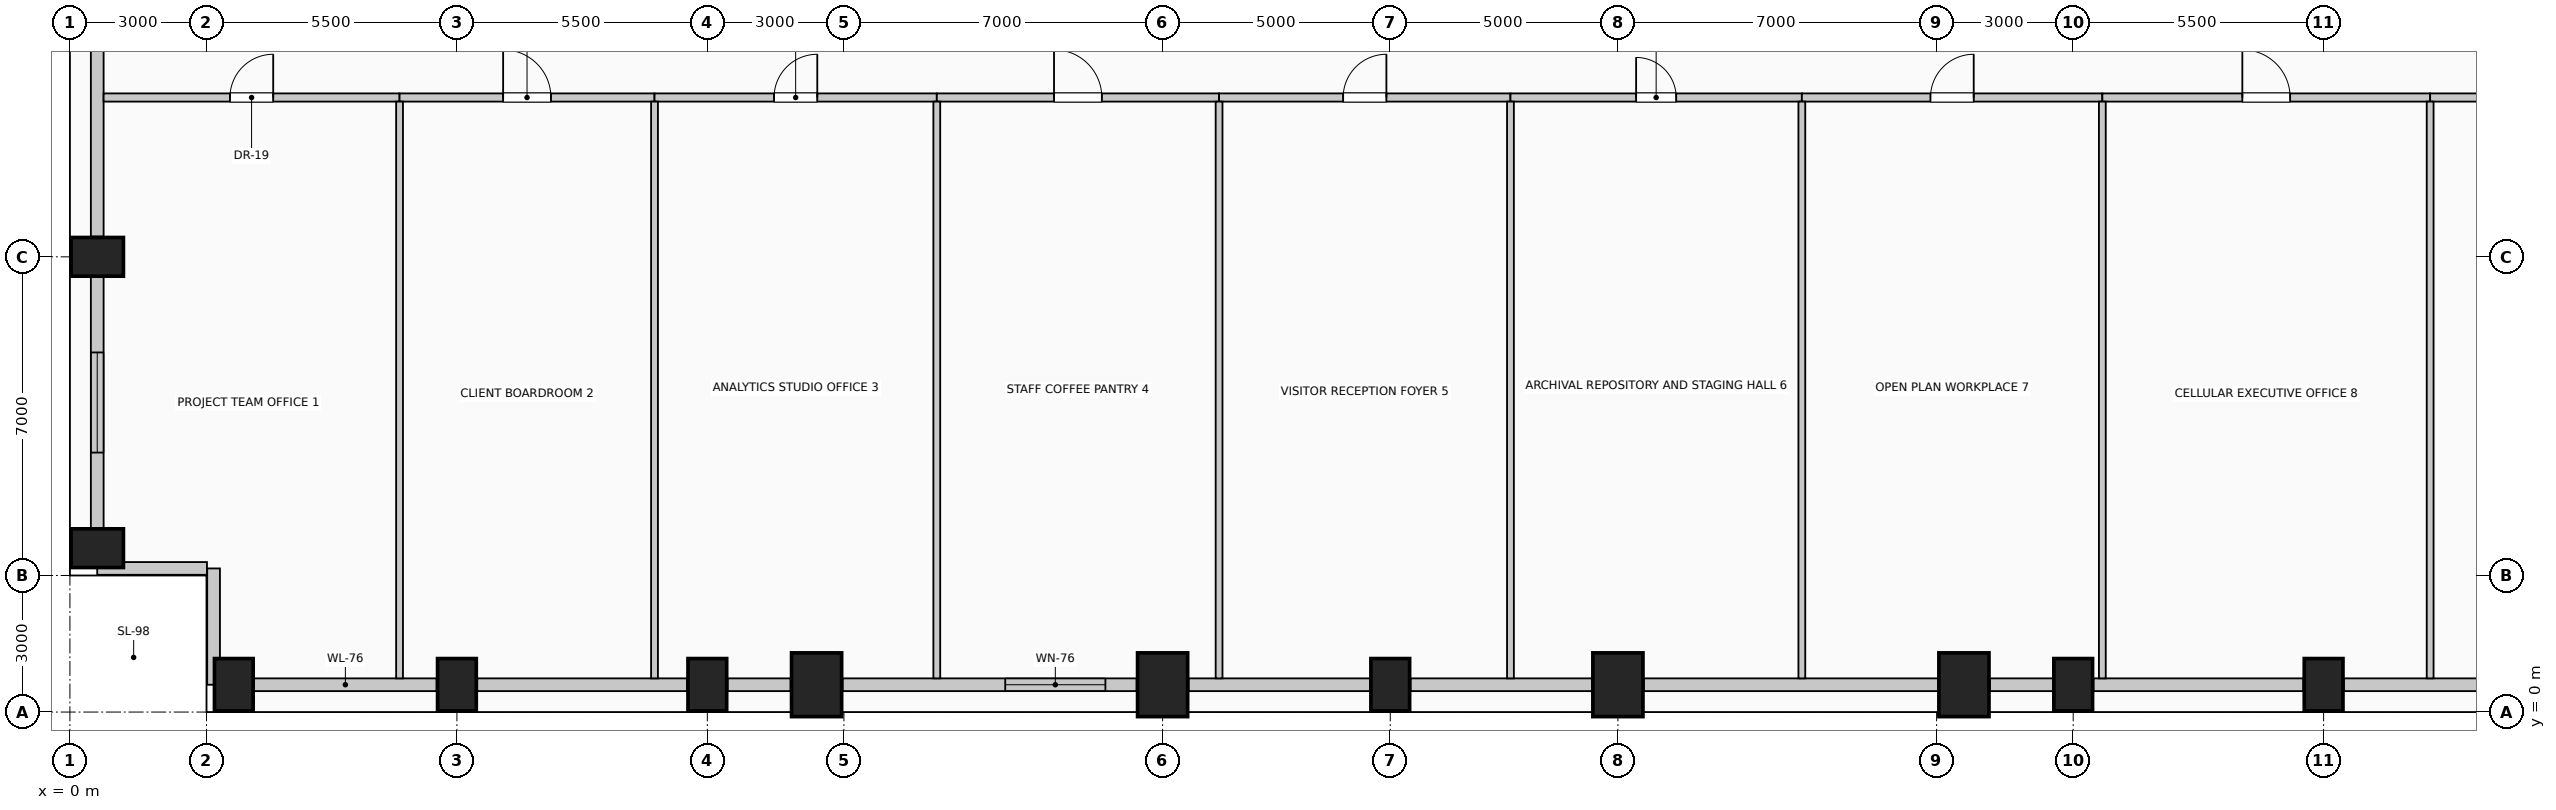
"""IFC4 building model, lengths in metres.
Left out: names, types, materials, properties, quantities, classifications, styles, units other than length and angle.
Written with IfcOpenShell. Run it as: python <this file> out.ifc"""

import sys

from ifc_helpers import new_model, si_unit, direction, frame, frame_2d, origin, origin_2d, place, context, subcontext, project, spatial, rectangle, extrude, element, fill, save


model = new_model("IFC4")
c1 = context("Model", 3, precision=1e-05, world=origin(), true_north=direction((0.0, 1.0)))
c2 = subcontext(c1, "Body", "Model", "MODEL_VIEW")
j1 = project(units=[si_unit("LENGTHUNIT", "METRE"), si_unit("PLANEANGLEUNIT", "RADIAN")], contexts=[c1])
p1 = place(None, origin())
s1 = spatial("IfcSite", under=j1, at=p1, CompositionType="ELEMENT")
p2 = place(p1, origin())
s2 = spatial("IfcBuilding", under=s1, at=p2, CompositionType="ELEMENT")
p3 = place(p2, frame((0.0, 0.0, 148.6)))
s3 = spatial("IfcBuildingStorey", under=s2, at=p3, CompositionType="ELEMENT", Elevation=148.6)
for number, where, z_axis, x_axis in (
    (1, (3.6, 0.6, 0.0), (0.0, 0.0, 1.0), (1.0, 0.0, 0.0)),
    (2, (8.5, 0.6, 0.0), (0.0, 0.0, 1.0), (1.0, 0.0, 0.0)),
    (3, (14.0, 0.6, 0.0), (0.0, 0.0, 1.0), (1.0, 0.0, 0.0)),
):
    element("IfcColumn", number, at=place(p3, frame(where, z_axis=z_axis, x_axis=x_axis)), inside=s3, PredefinedType="COLUMN", context=c2, shape_type="SweptSolid", body=[
        extrude(rectangle(XDim=0.85, YDim=1.15, at=origin_2d()), origin(), (0.0, 0.0, 1.0), 4.0),
    ])
for number, where, z_axis, x_axis in (
    (4, (16.4, 0.6, 0.0), (0.0, 0.0, 1.0), (1.0, 0.0, 0.0)),
    (5, (24.0, 0.6, 0.0), (0.0, 0.0, 1.0), (1.0, 0.0, 0.0)),
):
    element("IfcColumn", number, at=place(p3, frame(where, z_axis=z_axis, x_axis=x_axis)), inside=s3, PredefinedType="COLUMN", context=c2, shape_type="SweptSolid", body=[
        extrude(rectangle(XDim=1.1, YDim=1.4, at=origin_2d()), origin(), (0.0, 0.0, 1.0), 4.0),
    ])
p4 = place(p3, frame((29.0, 0.6, 0.0), z_axis=(0.0, 0.0, 1.0), x_axis=(1.0, 0.0, 0.0)))
e6 = element("IfcColumn", 6, at=p4, inside=s3, PredefinedType="COLUMN", context=c2, shape_type="SweptSolid", body=[
    extrude(rectangle(XDim=0.85, YDim=1.15, at=origin_2d()), origin(), (0.0, 0.0, 1.0), 4.0),
])
for number, where, z_axis, x_axis in (
    (7, (34.0, 0.6, 0.0), (0.0, 0.0, 1.0), (1.0, 0.0, 0.0)),
    (8, (41.6, 0.6, 0.0), (0.0, 0.0, 1.0), (1.0, 0.0, 0.0)),
):
    element("IfcColumn", number, at=place(p3, frame(where, z_axis=z_axis, x_axis=x_axis)), inside=s3, PredefinedType="COLUMN", context=c2, shape_type="SweptSolid", body=[
        extrude(rectangle(XDim=1.1, YDim=1.4, at=origin_2d()), origin(), (0.0, 0.0, 1.0), 4.0),
    ])
for number, where, z_axis, x_axis in (
    (9, (44.0, 0.6, 0.0), (0.0, 0.0, 1.0), (1.0, 0.0, 0.0)),
    (10, (49.5, 0.6, 0.0), (0.0, 0.0, 1.0), (1.0, 0.0, 0.0)),
    (11, (0.6, 3.6, 0.0), (0.0, 0.0, 1.0), (0.0, 1.0, 0.0)),
    (12, (0.6, 10.0, 0.0), (0.0, 0.0, 1.0), (0.0, 1.0, 0.0)),
):
    element("IfcColumn", number, at=place(p3, frame(where, z_axis=z_axis, x_axis=x_axis)), inside=s3, PredefinedType="COLUMN", context=c2, shape_type="SweptSolid", body=[
        extrude(rectangle(XDim=0.85, YDim=1.15, at=origin_2d()), origin(), (0.0, 0.0, 1.0), 4.0),
    ])
p5 = place(p3, frame((8.055, 0.6, 0.0), z_axis=(0.0, 0.0, 1.0), x_axis=(-1.0, 0.0, 0.0)))
e13 = element("IfcWall", 13, at=p5, inside=s3, PredefinedType="SOLIDWALL", context=c2, shape_type="SweptSolid", body=[
    extrude(rectangle(XDim=4.01, YDim=0.28, at=frame_2d((2.005, 0.0))), origin(), (0.0, 0.0, 1.0), 2.875),
])
p6 = place(p3, frame((13.555, 0.6, 0.0), z_axis=(0.0, 0.0, 1.0), x_axis=(-1.0, 0.0, 0.0)))
e14 = element("IfcWall", 14, at=p6, inside=s3, PredefinedType="SOLIDWALL", context=c2, shape_type="SweptSolid", body=[
    extrude(rectangle(XDim=4.61, YDim=0.28, at=frame_2d((2.305, 0.0))), origin(), (0.0, 0.0, 1.0), 2.875),
])
p7 = place(p3, frame((15.83, 0.6, 0.0), z_axis=(0.0, 0.0, 1.0), x_axis=(-1.0, 0.0, 0.0)))
e15 = element("IfcWall", 15, at=p7, inside=s3, PredefinedType="SOLIDWALL", context=c2, shape_type="SweptSolid", body=[
    extrude(rectangle(XDim=1.385, YDim=0.28, at=frame_2d((0.692, 0.0))), origin(), (0.0, 0.0, 1.0), 2.875),
])
p8 = place(p3, frame((23.43, 0.6, 0.0), z_axis=(0.0, 0.0, 1.0), x_axis=(-1.0, 0.0, 0.0)))
e16 = element("IfcWall", 16, at=p8, inside=s3, PredefinedType="SOLIDWALL", context=c2, shape_type="SweptSolid", body=[
    extrude(rectangle(XDim=6.46, YDim=0.28, at=frame_2d((3.23, 0.0))), origin(), (0.0, 0.0, 1.0), 2.875),
])
p9 = place(p8, frame((0.687, 0.0, 0.5)))
e17 = element("IfcOpeningElement", 17, at=p9, cuts=e16, PredefinedType="OPENING", context=c2, shape_type="SweptSolid", body=[
    extrude(rectangle(XDim=2.2, YDim=1.95, at=frame_2d((1.1, 0.975))), frame((0.0, 0.15, 0.0), z_axis=(0.0, -1.0, 0.0), x_axis=(1.0, 0.0, 0.0)), (0.0, 0.0, 1.0), 0.3),
])
for number, where, z_axis, x_axis in (
    (18, (28.555, 0.6, 0.0), (0.0, 0.0, 1.0), (-1.0, 0.0, 0.0)),
    (19, (33.43, 0.6, 0.0), (0.0, 0.0, 1.0), (-1.0, 0.0, 0.0)),
):
    element("IfcWall", number, at=place(p3, frame(where, z_axis=z_axis, x_axis=x_axis)), inside=s3, PredefinedType="SOLIDWALL", context=c2, shape_type="SweptSolid", body=[
        extrude(rectangle(XDim=3.985, YDim=0.28, at=frame_2d((1.992, 0.0))), origin(), (0.0, 0.0, 1.0), 2.875),
    ])
p10 = place(p3, frame((41.03, 0.6, 0.0), z_axis=(0.0, 0.0, 1.0), x_axis=(-1.0, 0.0, 0.0)))
e20 = element("IfcWall", 20, at=p10, inside=s3, PredefinedType="SOLIDWALL", context=c2, shape_type="SweptSolid", body=[
    extrude(rectangle(XDim=6.46, YDim=0.28, at=frame_2d((3.23, 0.0))), origin(), (0.0, 0.0, 1.0), 2.875),
])
p11 = place(p3, frame((43.555, 0.6, 0.0), z_axis=(0.0, 0.0, 1.0), x_axis=(-1.0, 0.0, 0.0)))
e21 = element("IfcWall", 21, at=p11, inside=s3, PredefinedType="SOLIDWALL", context=c2, shape_type="SweptSolid", body=[
    extrude(rectangle(XDim=1.385, YDim=0.28, at=frame_2d((0.692, 0.0))), origin(), (0.0, 0.0, 1.0), 2.875),
])
p12 = place(p3, frame((49.055, 0.6, 0.0), z_axis=(0.0, 0.0, 1.0), x_axis=(-1.0, 0.0, 0.0)))
e22 = element("IfcWall", 22, at=p12, inside=s3, PredefinedType="SOLIDWALL", context=c2, shape_type="SweptSolid", body=[
    extrude(rectangle(XDim=4.61, YDim=0.28, at=frame_2d((2.305, 0.0))), origin(), (0.0, 0.0, 1.0), 2.875),
])
p13 = place(p3, frame((53.955, 0.6, 0.0), z_axis=(0.0, 0.0, 1.0), x_axis=(-1.0, 0.0, 0.0)))
e23 = element("IfcWall", 23, at=p13, inside=s3, PredefinedType="SOLIDWALL", context=c2, shape_type="SweptSolid", body=[
    extrude(rectangle(XDim=4.01, YDim=0.28, at=frame_2d((2.005, 0.0))), origin(), (0.0, 0.0, 1.0), 2.875),
])
p14 = place(p3, frame((0.6, 4.045, 0.0), z_axis=(0.0, 0.0, 1.0), x_axis=(0.0, 1.0, 0.0)))
e24 = element("IfcWall", 24, at=p14, inside=s3, PredefinedType="SOLIDWALL", context=c2, shape_type="SweptSolid", body=[
    extrude(rectangle(XDim=5.51, YDim=0.28, at=frame_2d((2.755, 0.0))), origin(), (0.0, 0.0, 1.0), 2.875),
])
p15 = place(p14, frame((1.655, 0.0, 0.5)))
e25 = element("IfcOpeningElement", 25, at=p15, cuts=e24, PredefinedType="OPENING", context=c2, shape_type="SweptSolid", body=[
    extrude(rectangle(XDim=2.2, YDim=1.95, at=frame_2d((1.1, 0.975))), frame((0.0, 0.15, 0.0), z_axis=(0.0, -1.0, 0.0), x_axis=(1.0, 0.0, 0.0)), (0.0, 0.0, 1.0), 0.3),
])
p16 = place(p3, frame((0.6, 10.445, 0.0), z_axis=(0.0, 0.0, 1.0), x_axis=(0.0, 1.0, 0.0)))
e26 = element("IfcWall", 26, at=p16, inside=s3, PredefinedType="SOLIDWALL", context=c2, shape_type="SweptSolid", body=[
    extrude(rectangle(XDim=7.11, YDim=0.28, at=frame_2d((3.555, 0.0))), origin(), (0.0, 0.0, 1.0), 2.875),
])
p17 = place(p3, frame((3.155, 0.6, 0.0), z_axis=(0.0, 0.0, 1.0), x_axis=(0.0, 1.0, 0.0)))
e27 = element("IfcWall", 27, at=p17, inside=s3, PredefinedType="SOLIDWALL", context=c2, shape_type="SweptSolid", body=[
    extrude(rectangle(XDim=2.555, YDim=0.28, at=frame_2d((1.277, 0.0))), origin(), (0.0, 0.0, 1.0), 3.725),
])
p18 = place(p3, frame((3.01, 3.155, 0.0), z_axis=(0.0, 0.0, 1.0), x_axis=(-1.0, 0.0, 0.0)))
e28 = element("IfcWall", 28, at=p18, inside=s3, PredefinedType="SOLIDWALL", context=c2, shape_type="SweptSolid", body=[
    extrude(rectangle(XDim=2.41, YDim=0.28, at=frame_2d((1.205, 0.0))), origin(), (0.0, 0.0, 1.0), 3.725),
])
p19 = place(p3, frame((0.74, 13.5, 0.0), z_axis=(0.0, 0.0, 1.0), x_axis=(1.0, 0.0, 0.0)))
e29 = element("IfcWall", 29, at=p19, inside=s3, PredefinedType="PARTITIONING", context=c2, shape_type="SweptSolid", body=[
    extrude(rectangle(XDim=6.5, YDim=0.18, at=frame_2d((3.25, 0.0))), origin(), (0.0, 0.0, 1.0), 3.725),
])
p20 = place(p19, frame((2.775, 0.0, 0.0)))
e30 = element("IfcOpeningElement", 30, at=p20, cuts=e29, PredefinedType="OPENING", context=c2, shape_type="SweptSolid", body=[
    extrude(rectangle(XDim=0.95, YDim=2.15, at=frame_2d((0.475, 1.075))), frame((0.0, 0.1, 0.0), z_axis=(0.0, -1.0, 0.0), x_axis=(1.0, 0.0, 0.0)), (0.0, 0.0, 1.0), 0.2),
])
p21 = place(p3, frame((7.24, 13.5, 0.0), z_axis=(0.0, 0.0, 1.0), x_axis=(1.0, 0.0, 0.0)))
e31 = element("IfcWall", 31, at=p21, inside=s3, PredefinedType="PARTITIONING", context=c2, shape_type="SweptSolid", body=[
    extrude(rectangle(XDim=5.6, YDim=0.18, at=frame_2d((2.8, 0.0))), origin(), (0.0, 0.0, 1.0), 3.725),
])
p22 = place(p21, frame((2.275, 0.0, 0.0)))
e32 = element("IfcOpeningElement", 32, at=p22, cuts=e31, PredefinedType="OPENING", context=c2, shape_type="SweptSolid", body=[
    extrude(rectangle(XDim=1.05, YDim=2.15, at=frame_2d((0.525, 1.075))), frame((0.0, 0.1, 0.0), z_axis=(0.0, -1.0, 0.0), x_axis=(1.0, 0.0, 0.0)), (0.0, 0.0, 1.0), 0.2),
])
p23 = place(p3, frame((12.84, 13.5, 0.0), z_axis=(0.0, 0.0, 1.0), x_axis=(1.0, 0.0, 0.0)))
e33 = element("IfcWall", 33, at=p23, inside=s3, PredefinedType="PARTITIONING", context=c2, shape_type="SweptSolid", body=[
    extrude(rectangle(XDim=6.2, YDim=0.18, at=frame_2d((3.1, 0.0))), origin(), (0.0, 0.0, 1.0), 3.725),
])
p24 = place(p23, frame((2.625, 0.0, 0.0)))
e34 = element("IfcOpeningElement", 34, at=p24, cuts=e33, PredefinedType="OPENING", context=c2, shape_type="SweptSolid", body=[
    extrude(rectangle(XDim=0.95, YDim=2.15, at=frame_2d((0.475, 1.075))), frame((0.0, 0.1, 0.0), z_axis=(0.0, -1.0, 0.0), x_axis=(1.0, 0.0, 0.0)), (0.0, 0.0, 1.0), 0.2),
])
p25 = place(p3, frame((19.04, 13.5, 0.0), z_axis=(0.0, 0.0, 1.0), x_axis=(1.0, 0.0, 0.0)))
e35 = element("IfcWall", 35, at=p25, inside=s3, PredefinedType="PARTITIONING", context=c2, shape_type="SweptSolid", body=[
    extrude(rectangle(XDim=6.2, YDim=0.18, at=frame_2d((3.1, 0.0))), origin(), (0.0, 0.0, 1.0), 3.725),
])
p26 = place(p25, frame((2.575, 0.0, 0.0)))
e36 = element("IfcOpeningElement", 36, at=p26, cuts=e35, PredefinedType="OPENING", context=c2, shape_type="SweptSolid", body=[
    extrude(rectangle(XDim=1.05, YDim=2.15, at=frame_2d((0.525, 1.075))), frame((0.0, 0.1, 0.0), z_axis=(0.0, -1.0, 0.0), x_axis=(1.0, 0.0, 0.0)), (0.0, 0.0, 1.0), 0.2),
])
p27 = place(p3, frame((25.24, 13.5, 0.0), z_axis=(0.0, 0.0, 1.0), x_axis=(1.0, 0.0, 0.0)))
e37 = element("IfcWall", 37, at=p27, inside=s3, PredefinedType="PARTITIONING", context=c2, shape_type="SweptSolid", body=[
    extrude(rectangle(XDim=6.4, YDim=0.18, at=frame_2d((3.2, 0.0))), origin(), (0.0, 0.0, 1.0), 3.725),
])
p28 = place(p27, frame((2.725, 0.0, 0.0)))
e38 = element("IfcOpeningElement", 38, at=p28, cuts=e37, PredefinedType="OPENING", context=c2, shape_type="SweptSolid", body=[
    extrude(rectangle(XDim=0.95, YDim=2.15, at=frame_2d((0.475, 1.075))), frame((0.0, 0.1, 0.0), z_axis=(0.0, -1.0, 0.0), x_axis=(1.0, 0.0, 0.0)), (0.0, 0.0, 1.0), 0.2),
])
p29 = place(p3, frame((31.64, 13.5, 0.0), z_axis=(0.0, 0.0, 1.0), x_axis=(1.0, 0.0, 0.0)))
e39 = element("IfcWall", 39, at=p29, inside=s3, PredefinedType="PARTITIONING", context=c2, shape_type="SweptSolid", body=[
    extrude(rectangle(XDim=6.4, YDim=0.18, at=frame_2d((3.2, 0.0))), origin(), (0.0, 0.0, 1.0), 3.725),
])
p30 = place(p29, frame((2.76, 0.0, 0.0)))
e40 = element("IfcOpeningElement", 40, at=p30, cuts=e39, PredefinedType="OPENING", context=c2, shape_type="SweptSolid", body=[
    extrude(rectangle(XDim=0.88, YDim=2.1, at=frame_2d((0.44, 1.05))), frame((0.0, 0.1, 0.0), z_axis=(0.0, -1.0, 0.0), x_axis=(1.0, 0.0, 0.0)), (0.0, 0.0, 1.0), 0.2),
])
p31 = place(p3, frame((38.04, 13.5, 0.0), z_axis=(0.0, 0.0, 1.0), x_axis=(1.0, 0.0, 0.0)))
e41 = element("IfcWall", 41, at=p31, inside=s3, PredefinedType="PARTITIONING", context=c2, shape_type="SweptSolid", body=[
    extrude(rectangle(XDim=6.6, YDim=0.18, at=frame_2d((3.3, 0.0))), origin(), (0.0, 0.0, 1.0), 3.725),
])
p32 = place(p31, frame((2.825, 0.0, 0.0)))
e42 = element("IfcOpeningElement", 42, at=p32, cuts=e41, PredefinedType="OPENING", context=c2, shape_type="SweptSolid", body=[
    extrude(rectangle(XDim=0.95, YDim=2.15, at=frame_2d((0.475, 1.075))), frame((0.0, 0.1, 0.0), z_axis=(0.0, -1.0, 0.0), x_axis=(1.0, 0.0, 0.0)), (0.0, 0.0, 1.0), 0.2),
])
p33 = place(p3, frame((44.64, 13.5, 0.0), z_axis=(0.0, 0.0, 1.0), x_axis=(1.0, 0.0, 0.0)))
e43 = element("IfcWall", 43, at=p33, inside=s3, PredefinedType="PARTITIONING", context=c2, shape_type="SweptSolid", body=[
    extrude(rectangle(XDim=7.2, YDim=0.18, at=frame_2d((3.6, 0.0))), origin(), (0.0, 0.0, 1.0), 3.725),
])
p34 = place(p33, frame((3.075, 0.0, 0.0)))
e44 = element("IfcOpeningElement", 44, at=p34, cuts=e43, PredefinedType="OPENING", context=c2, shape_type="SweptSolid", body=[
    extrude(rectangle(XDim=1.05, YDim=2.15, at=frame_2d((0.525, 1.075))), frame((0.0, 0.1, 0.0), z_axis=(0.0, -1.0, 0.0), x_axis=(1.0, 0.0, 0.0)), (0.0, 0.0, 1.0), 0.2),
])
p35 = place(p3, frame((51.84, 13.5, 0.0), z_axis=(0.0, 0.0, 1.0), x_axis=(1.0, 0.0, 0.0)))
e45 = element("IfcWall", 45, at=p35, inside=s3, PredefinedType="PARTITIONING", context=c2, shape_type="SweptSolid", body=[
    extrude(rectangle(XDim=5.42, YDim=0.18, at=frame_2d((2.71, 0.0))), origin(), (0.0, 0.0, 1.0), 3.725),
])
p36 = place(p35, frame((2.235, 0.0, 0.0)))
e46 = element("IfcOpeningElement", 46, at=p36, cuts=e45, PredefinedType="OPENING", context=c2, shape_type="SweptSolid", body=[
    extrude(rectangle(XDim=0.95, YDim=2.15, at=frame_2d((0.475, 1.075))), frame((0.0, 0.1, 0.0), z_axis=(0.0, -1.0, 0.0), x_axis=(1.0, 0.0, 0.0)), (0.0, 0.0, 1.0), 0.2),
])
for number, where, z_axis, x_axis in (
    (47, (7.24, 0.74, 0.0), (0.0, 0.0, 1.0), (0.0, 1.0, 0.0)),
    (48, (12.84, 0.74, 0.0), (0.0, 0.0, 1.0), (0.0, 1.0, 0.0)),
    (49, (19.04, 0.74, 0.0), (0.0, 0.0, 1.0), (0.0, 1.0, 0.0)),
    (50, (25.24, 0.74, 0.0), (0.0, 0.0, 1.0), (0.0, 1.0, 0.0)),
    (51, (31.64, 0.74, 0.0), (0.0, 0.0, 1.0), (0.0, 1.0, 0.0)),
    (52, (38.04, 0.74, 0.0), (0.0, 0.0, 1.0), (0.0, 1.0, 0.0)),
    (53, (44.64, 0.74, 0.0), (0.0, 0.0, 1.0), (0.0, 1.0, 0.0)),
    (54, (51.84, 0.74, 0.0), (0.0, 0.0, 1.0), (0.0, 1.0, 0.0)),
):
    element("IfcWall", number, at=place(p3, frame(where, z_axis=z_axis, x_axis=x_axis)), inside=s3, PredefinedType="PARTITIONING", context=c2, shape_type="SweptSolid", body=[
        extrude(rectangle(XDim=12.67, YDim=0.15, at=frame_2d((6.335, 0.0))), origin(), (0.0, 0.0, 1.0), 3.725),
    ])
p37 = place(p9, origin())
e55 = element("IfcWindow", 55, at=p37, inside=s3, PartitioningType="SINGLE_PANEL", PredefinedType="WINDOW", context=c2, shape_type="SweptSolid", body=[
    extrude(rectangle(XDim=2.2, YDim=1.95, at=frame_2d((1.1, 0.975))), frame((0.0, 0.03, 0.0), z_axis=(0.0, -1.0, 0.0), x_axis=(1.0, 0.0, 0.0)), (0.0, 0.0, 1.0), 0.06),
])
fill(e17, e55)
p38 = place(p15, origin())
e56 = element("IfcWindow", 56, at=p38, inside=s3, PartitioningType="SINGLE_PANEL", PredefinedType="WINDOW", context=c2, shape_type="SweptSolid", body=[
    extrude(rectangle(XDim=2.2, YDim=1.95, at=frame_2d((1.1, 0.975))), frame((0.0, 0.03, 0.0), z_axis=(0.0, -1.0, 0.0), x_axis=(1.0, 0.0, 0.0)), (0.0, 0.0, 1.0), 0.06),
])
fill(e25, e56)
p39 = place(p20, origin())
e57 = element("IfcDoor", 57, at=p39, inside=s3, OperationType="SINGLE_SWING_RIGHT", PredefinedType="DOOR", context=c2, shape_type="SweptSolid", body=[
    extrude(rectangle(XDim=0.95, YDim=2.15, at=frame_2d((0.475, 1.075))), frame((0.0, 0.025, 0.0), z_axis=(0.0, -1.0, 0.0), x_axis=(1.0, 0.0, 0.0)), (0.0, 0.0, 1.0), 0.05),
])
fill(e30, e57)
p40 = place(p22, origin())
e58 = element("IfcDoor", 58, at=p40, inside=s3, OperationType="SINGLE_SWING_LEFT", PredefinedType="DOOR", context=c2, shape_type="SweptSolid", body=[
    extrude(rectangle(XDim=1.05, YDim=2.15, at=frame_2d((0.525, 1.075))), frame((0.0, 0.025, 0.0), z_axis=(0.0, -1.0, 0.0), x_axis=(1.0, 0.0, 0.0)), (0.0, 0.0, 1.0), 0.05),
])
fill(e32, e58)
p41 = place(p24, origin())
e59 = element("IfcDoor", 59, at=p41, inside=s3, OperationType="SINGLE_SWING_RIGHT", PredefinedType="DOOR", context=c2, shape_type="SweptSolid", body=[
    extrude(rectangle(XDim=0.95, YDim=2.15, at=frame_2d((0.475, 1.075))), frame((0.0, 0.025, 0.0), z_axis=(0.0, -1.0, 0.0), x_axis=(1.0, 0.0, 0.0)), (0.0, 0.0, 1.0), 0.05),
])
fill(e34, e59)
p42 = place(p26, origin())
e60 = element("IfcDoor", 60, at=p42, inside=s3, OperationType="SINGLE_SWING_LEFT", PredefinedType="DOOR", context=c2, shape_type="SweptSolid", body=[
    extrude(rectangle(XDim=1.05, YDim=2.15, at=frame_2d((0.525, 1.075))), frame((0.0, 0.025, 0.0), z_axis=(0.0, -1.0, 0.0), x_axis=(1.0, 0.0, 0.0)), (0.0, 0.0, 1.0), 0.05),
])
fill(e36, e60)
p43 = place(p28, origin())
e61 = element("IfcDoor", 61, at=p43, inside=s3, OperationType="SINGLE_SWING_RIGHT", PredefinedType="DOOR", context=c2, shape_type="SweptSolid", body=[
    extrude(rectangle(XDim=0.95, YDim=2.15, at=frame_2d((0.475, 1.075))), frame((0.0, 0.025, 0.0), z_axis=(0.0, -1.0, 0.0), x_axis=(1.0, 0.0, 0.0)), (0.0, 0.0, 1.0), 0.05),
])
fill(e38, e61)
p44 = place(p30, origin())
e62 = element("IfcDoor", 62, at=p44, inside=s3, OperationType="SINGLE_SWING_LEFT", PredefinedType="DOOR", context=c2, shape_type="SweptSolid", body=[
    extrude(rectangle(XDim=0.88, YDim=2.1, at=frame_2d((0.44, 1.05))), frame((0.0, 0.025, 0.0), z_axis=(0.0, -1.0, 0.0), x_axis=(1.0, 0.0, 0.0)), (0.0, 0.0, 1.0), 0.05),
])
fill(e40, e62)
p45 = place(p32, origin())
e63 = element("IfcDoor", 63, at=p45, inside=s3, OperationType="SINGLE_SWING_RIGHT", PredefinedType="DOOR", context=c2, shape_type="SweptSolid", body=[
    extrude(rectangle(XDim=0.95, YDim=2.15, at=frame_2d((0.475, 1.075))), frame((0.0, 0.025, 0.0), z_axis=(0.0, -1.0, 0.0), x_axis=(1.0, 0.0, 0.0)), (0.0, 0.0, 1.0), 0.05),
])
fill(e42, e63)
p46 = place(p34, origin())
e64 = element("IfcDoor", 64, at=p46, inside=s3, OperationType="SINGLE_SWING_LEFT", PredefinedType="DOOR", context=c2, shape_type="SweptSolid", body=[
    extrude(rectangle(XDim=1.05, YDim=2.15, at=frame_2d((0.525, 1.075))), frame((0.0, 0.025, 0.0), z_axis=(0.0, -1.0, 0.0), x_axis=(1.0, 0.0, 0.0)), (0.0, 0.0, 1.0), 0.05),
])
fill(e44, e64)
save(model, sys.argv[1])
